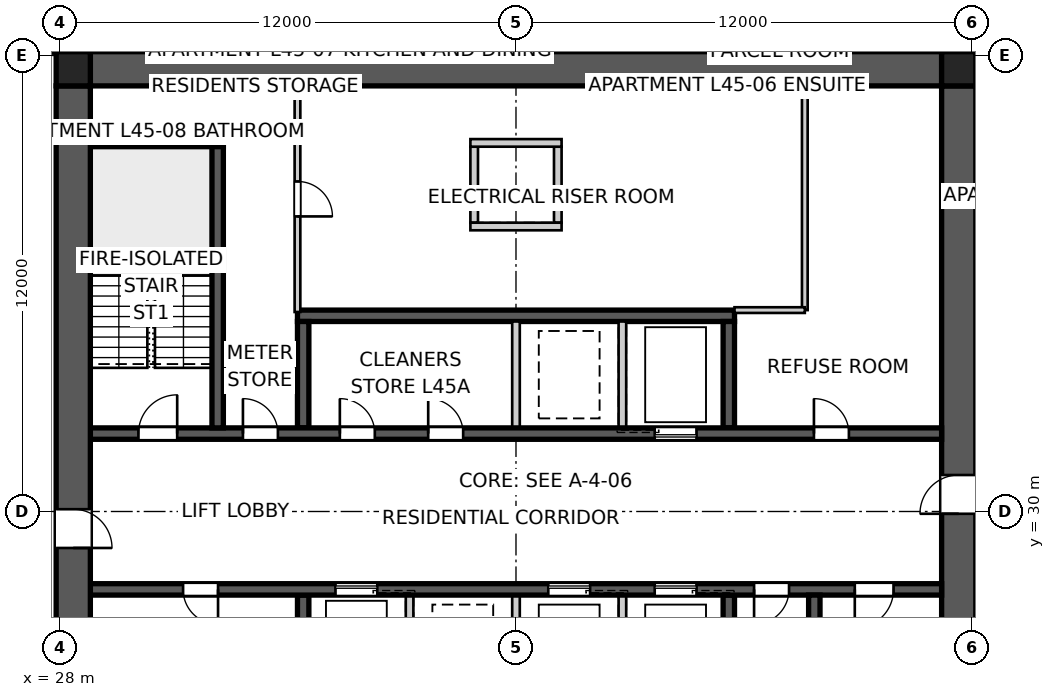
"""IFC4 building model, lengths in metres.
Left out: names, types, materials, properties, quantities, classifications, styles, units other than length and angle.
Written with IfcOpenShell. Run it as: python <this file> out.ifc"""

import sys

from ifc_helpers import new_model, si_unit, direction, frame, frame_2d, origin, origin_2d, place, context, subcontext, project, spatial, polyline, rectangle, outline, extrude, element, fill, save


model = new_model("IFC4")
c1 = context("Model", 3, precision=1e-05, world=origin(), true_north=direction((0.0, 1.0)))
c2 = subcontext(c1, "Body", "Model", "MODEL_VIEW")
j1 = project(units=[si_unit("LENGTHUNIT", "METRE"), si_unit("PLANEANGLEUNIT", "RADIAN")], contexts=[c1])
p1 = place(None, origin())
s1 = spatial("IfcSite", under=j1, at=p1, CompositionType="ELEMENT")
p2 = place(p1, origin())
s2 = spatial("IfcBuilding", under=s1, at=p2, CompositionType="ELEMENT")
p3 = place(p2, frame((0.0, 0.0, 164.2)))
s3 = spatial("IfcBuildingStorey", under=s2, at=p3, CompositionType="ELEMENT", Elevation=164.2)
p4 = place(p3, frame((28.8, 41.65, 0.0), z_axis=(0.0, 0.0, 1.0), x_axis=(1.0, 0.0, 0.0)))
e1 = element("IfcWall", 1, at=p4, inside=s3, PredefinedType="SHEAR", context=c2, shape_type="SweptSolid", body=[
    extrude(outline(polyline([(0.0, -0.45), (22.4, -0.45), (22.4, -0.025), (22.85, -0.025), (22.85, 0.025), (22.4, 0.025), (22.4, 0.45), (0.0, 0.45), (0.0, 0.025), (-0.45, 0.025), (-0.45, -0.025), (0.0, -0.025), (0.0, -0.45)])), origin(), (0.0, 0.0, 1.0), 3.4),
])
p5 = place(p3, frame((51.65, 18.8, 0.0), z_axis=(0.0, 0.0, 1.0), x_axis=(0.0, 1.0, 0.0)))
e2 = element("IfcWall", 2, at=p5, inside=s3, PredefinedType="SHEAR", context=c2, shape_type="SweptSolid", body=[
    extrude(outline(polyline([(0.0, -0.45), (22.4, -0.45), (22.4, -0.025), (22.85, -0.025), (22.85, 0.025), (22.4, 0.025), (22.4, 0.45), (0.0, 0.45), (0.0, 0.025), (-0.45, 0.025), (-0.45, -0.025), (0.0, -0.025), (0.0, -0.45)])), origin(), (0.0, 0.0, 1.0), 3.4),
])
p6 = place(p5, frame((11.14, 0.0, 0.0)))
e3 = element("IfcOpeningElement", 3, at=p6, cuts=e2, PredefinedType="OPENING", context=c2, shape_type="SweptSolid", body=[
    extrude(rectangle(XDim=1.02, YDim=2.4, at=frame_2d((0.51, 1.2))), frame((0.0, 0.46, 0.0), z_axis=(0.0, -1.0, 0.0), x_axis=(1.0, 0.0, 0.0)), (0.0, 0.0, 1.0), 0.92),
])
p7 = place(p3, frame((28.35, 41.2, 0.0), z_axis=(0.0, 0.0, 1.0), x_axis=(0.0, -1.0, 0.0)))
e4 = element("IfcWall", 4, at=p7, inside=s3, PredefinedType="SHEAR", context=c2, shape_type="SweptSolid", body=[
    extrude(outline(polyline([(0.0, -0.45), (22.4, -0.45), (22.4, -0.025), (22.85, -0.025), (22.85, 0.025), (22.4, 0.025), (22.4, 0.45), (0.0, 0.45), (0.0, 0.025), (-0.45, 0.025), (-0.45, -0.025), (0.0, -0.025), (0.0, -0.45)])), origin(), (0.0, 0.0, 1.0), 3.4),
])
p8 = place(p7, frame((11.14, 0.0, 0.0)))
e5 = element("IfcOpeningElement", 5, at=p8, cuts=e4, PredefinedType="OPENING", context=c2, shape_type="SweptSolid", body=[
    extrude(rectangle(XDim=1.02, YDim=2.4, at=frame_2d((0.51, 1.2))), frame((0.0, 0.46, 0.0), z_axis=(0.0, -1.0, 0.0), x_axis=(1.0, 0.0, 0.0)), (0.0, 0.0, 1.0), 0.92),
])
p9 = place(p3, frame((28.8, 32.05, 0.0), z_axis=(0.0, 0.0, 1.0), x_axis=(1.0, 0.0, 0.0)))
e6 = element("IfcWall", 6, at=p9, inside=s3, PredefinedType="SHEAR", context=c2, shape_type="SweptSolid", body=[
    extrude(rectangle(XDim=22.4, YDim=0.3, at=frame_2d((11.2, 0.0))), origin(), (0.0, 0.0, 1.0), 3.4),
])
p10 = place(p9, frame((19.04, 0.0, 0.0)))
e7 = element("IfcOpeningElement", 7, at=p10, cuts=e6, PredefinedType="OPENING", context=c2, shape_type="SweptSolid", body=[
    extrude(rectangle(XDim=0.92, YDim=2.1, at=frame_2d((0.46, 1.05))), frame((0.0, 0.16, 0.0), z_axis=(0.0, -1.0, 0.0), x_axis=(1.0, 0.0, 0.0)), (0.0, 0.0, 1.0), 0.32),
])
p11 = place(p9, frame((1.265, 0.0, 0.0)))
e8 = element("IfcOpeningElement", 8, at=p11, cuts=e6, PredefinedType="OPENING", context=c2, shape_type="SweptSolid", body=[
    extrude(rectangle(XDim=1.02, YDim=2.1, at=frame_2d((0.51, 1.05))), frame((0.0, 0.16, 0.0), z_axis=(0.0, -1.0, 0.0), x_axis=(1.0, 0.0, 0.0)), (0.0, 0.0, 1.0), 0.32),
])
p12 = place(p9, frame((4.015, 0.0, 0.0)))
e9 = element("IfcOpeningElement", 9, at=p12, cuts=e6, PredefinedType="OPENING", context=c2, shape_type="SweptSolid", body=[
    extrude(rectangle(XDim=0.92, YDim=2.1, at=frame_2d((0.46, 1.05))), frame((0.0, 0.16, 0.0), z_axis=(0.0, -1.0, 0.0), x_axis=(1.0, 0.0, 0.0)), (0.0, 0.0, 1.0), 0.32),
])
p13 = place(p9, frame((6.565, 0.0, 0.0)))
e10 = element("IfcOpeningElement", 10, at=p13, cuts=e6, PredefinedType="OPENING", context=c2, shape_type="SweptSolid", body=[
    extrude(rectangle(XDim=0.92, YDim=2.1, at=frame_2d((0.46, 1.05))), frame((0.0, 0.16, 0.0), z_axis=(0.0, -1.0, 0.0), x_axis=(1.0, 0.0, 0.0)), (0.0, 0.0, 1.0), 0.32),
])
p14 = place(p9, frame((8.89, 0.0, 0.0)))
e11 = element("IfcOpeningElement", 11, at=p14, cuts=e6, PredefinedType="OPENING", context=c2, shape_type="SweptSolid", body=[
    extrude(rectangle(XDim=0.92, YDim=2.1, at=frame_2d((0.46, 1.05))), frame((0.0, 0.16, 0.0), z_axis=(0.0, -1.0, 0.0), x_axis=(1.0, 0.0, 0.0)), (0.0, 0.0, 1.0), 0.32),
])
p15 = place(p9, frame((14.85, 0.0, 0.0)))
e12 = element("IfcOpeningElement", 12, at=p15, cuts=e6, PredefinedType="OPENING", context=c2, shape_type="SweptSolid", body=[
    extrude(rectangle(XDim=1.1, YDim=2.1, at=frame_2d((0.55, 1.05))), frame((0.0, 0.16, 0.0), z_axis=(0.0, -1.0, 0.0), x_axis=(1.0, 0.0, 0.0)), (0.0, 0.0, 1.0), 0.32),
])
p16 = place(p3, frame((51.2, 27.95, 0.0), z_axis=(0.0, 0.0, 1.0), x_axis=(-1.0, 0.0, 0.0)))
e13 = element("IfcWall", 13, at=p16, inside=s3, PredefinedType="SHEAR", context=c2, shape_type="SweptSolid", body=[
    extrude(rectangle(XDim=22.4, YDim=0.3, at=frame_2d((11.2, 0.0))), origin(), (0.0, 0.0, 1.0), 3.4),
])
p17 = place(p16, frame((19.04, 0.0, 0.0)))
e14 = element("IfcOpeningElement", 14, at=p17, cuts=e13, PredefinedType="OPENING", context=c2, shape_type="SweptSolid", body=[
    extrude(rectangle(XDim=0.92, YDim=2.1, at=frame_2d((0.46, 1.05))), frame((0.0, 0.16, 0.0), z_axis=(0.0, -1.0, 0.0), x_axis=(1.0, 0.0, 0.0)), (0.0, 0.0, 1.0), 0.32),
])
p18 = place(p16, frame((1.265, 0.0, 0.0)))
e15 = element("IfcOpeningElement", 15, at=p18, cuts=e13, PredefinedType="OPENING", context=c2, shape_type="SweptSolid", body=[
    extrude(rectangle(XDim=1.02, YDim=2.1, at=frame_2d((0.51, 1.05))), frame((0.0, 0.16, 0.0), z_axis=(0.0, -1.0, 0.0), x_axis=(1.0, 0.0, 0.0)), (0.0, 0.0, 1.0), 0.32),
])
p19 = place(p16, frame((4.015, 0.0, 0.0)))
e16 = element("IfcOpeningElement", 16, at=p19, cuts=e13, PredefinedType="OPENING", context=c2, shape_type="SweptSolid", body=[
    extrude(rectangle(XDim=0.92, YDim=2.1, at=frame_2d((0.46, 1.05))), frame((0.0, 0.16, 0.0), z_axis=(0.0, -1.0, 0.0), x_axis=(1.0, 0.0, 0.0)), (0.0, 0.0, 1.0), 0.32),
])
p20 = place(p16, frame((6.45, 0.0, 0.0)))
e17 = element("IfcOpeningElement", 17, at=p20, cuts=e13, PredefinedType="OPENING", context=c2, shape_type="SweptSolid", body=[
    extrude(rectangle(XDim=1.1, YDim=2.1, at=frame_2d((0.55, 1.05))), frame((0.0, 0.16, 0.0), z_axis=(0.0, -1.0, 0.0), x_axis=(1.0, 0.0, 0.0)), (0.0, 0.0, 1.0), 0.32),
])
p21 = place(p16, frame((9.25, 0.0, 0.0)))
e18 = element("IfcOpeningElement", 18, at=p21, cuts=e13, PredefinedType="OPENING", context=c2, shape_type="SweptSolid", body=[
    extrude(rectangle(XDim=1.1, YDim=2.1, at=frame_2d((0.55, 1.05))), frame((0.0, 0.16, 0.0), z_axis=(0.0, -1.0, 0.0), x_axis=(1.0, 0.0, 0.0)), (0.0, 0.0, 1.0), 0.32),
])
p22 = place(p16, frame((14.85, 0.0, 0.0)))
e19 = element("IfcOpeningElement", 19, at=p22, cuts=e13, PredefinedType="OPENING", context=c2, shape_type="SweptSolid", body=[
    extrude(rectangle(XDim=1.1, YDim=2.1, at=frame_2d((0.55, 1.05))), frame((0.0, 0.16, 0.0), z_axis=(0.0, -1.0, 0.0), x_axis=(1.0, 0.0, 0.0)), (0.0, 0.0, 1.0), 0.32),
])
p23 = place(p3, frame((34.25, 35.15, 0.0), z_axis=(0.0, 0.0, 1.0), x_axis=(1.0, 0.0, 0.0)))
e20 = element("IfcWall", 20, at=p23, inside=s3, PredefinedType="SHEAR", context=c2, shape_type="SweptSolid", body=[
    extrude(rectangle(XDim=11.5, YDim=0.3, at=frame_2d((5.75, 0.0))), origin(), (0.0, 0.0, 1.0), 3.4),
])
for number, where, z_axis, x_axis in (
    (21, (34.4, 32.2, 0.0), (0.0, 0.0, 1.0), (0.0, 1.0, 0.0)),
    (22, (45.6, 27.8, 0.0), (0.0, 0.0, 1.0), (0.0, -1.0, 0.0)),
):
    element("IfcWall", number, at=place(p3, frame(where, z_axis=z_axis, x_axis=x_axis)), inside=s3, PredefinedType="SHEAR", context=c2, shape_type="SweptSolid", body=[
        extrude(rectangle(XDim=2.8, YDim=0.3, at=frame_2d((1.4, 0.0))), origin(), (0.0, 0.0, 1.0), 3.4),
    ])
for number, where, z_axis, x_axis in (
    (23, (42.8, 27.8, 0.0), (0.0, 0.0, 1.0), (0.0, -1.0, 0.0)),
    (24, (40.0, 32.2, 0.0), (0.0, 0.0, 1.0), (0.0, 1.0, 0.0)),
    (25, (40.0, 27.8, 0.0), (0.0, 0.0, 1.0), (0.0, -1.0, 0.0)),
    (26, (42.8, 32.2, 0.0), (0.0, 0.0, 1.0), (0.0, 1.0, 0.0)),
    (27, (37.2, 27.8, 0.0), (0.0, 0.0, 1.0), (0.0, -1.0, 0.0)),
):
    element("IfcWall", number, at=place(p3, frame(where, z_axis=z_axis, x_axis=x_axis)), inside=s3, PredefinedType="SOLIDWALL", context=c2, shape_type="SweptSolid", body=[
        extrude(rectangle(XDim=2.8, YDim=0.2, at=frame_2d((1.4, 0.0))), origin(), (0.0, 0.0, 1.0), 3.4),
    ])
for number, where, z_axis, x_axis in (
    (28, (45.6, 32.2, 0.0), (0.0, 0.0, 1.0), (0.0, 1.0, 0.0)),
    (29, (34.4, 27.8, 0.0), (0.0, 0.0, 1.0), (0.0, -1.0, 0.0)),
):
    element("IfcWall", number, at=place(p3, frame(where, z_axis=z_axis, x_axis=x_axis)), inside=s3, PredefinedType="SHEAR", context=c2, shape_type="SweptSolid", body=[
        extrude(rectangle(XDim=2.8, YDim=0.3, at=frame_2d((1.4, 0.0))), origin(), (0.0, 0.0, 1.0), 3.4),
    ])
p24 = place(p3, frame((32.15, 32.2, 0.0), z_axis=(0.0, 0.0, 1.0), x_axis=(0.0, 1.0, 0.0)))
e30 = element("IfcWall", 30, at=p24, inside=s3, PredefinedType="SHEAR", context=c2, shape_type="SweptSolid", body=[
    extrude(rectangle(XDim=7.7, YDim=0.3, at=frame_2d((3.85, 0.0))), origin(), (0.0, 0.0, 1.0), 3.4),
])
p25 = place(p3, frame((28.8, 39.75, 0.0), z_axis=(0.0, 0.0, 1.0), x_axis=(1.0, 0.0, 0.0)))
e31 = element("IfcWall", 31, at=p25, inside=s3, PredefinedType="SHEAR", context=c2, shape_type="SweptSolid", body=[
    extrude(rectangle(XDim=3.5, YDim=0.3, at=frame_2d((1.75, 0.0))), origin(), (0.0, 0.0, 1.0), 3.4),
])
p26 = place(p3, frame((47.85, 27.8, 0.0), z_axis=(0.0, 0.0, 1.0), x_axis=(0.0, -1.0, 0.0)))
e32 = element("IfcWall", 32, at=p26, inside=s3, PredefinedType="SHEAR", context=c2, shape_type="SweptSolid", body=[
    extrude(rectangle(XDim=7.7, YDim=0.3, at=frame_2d((3.85, 0.0))), origin(), (0.0, 0.0, 1.0), 3.4),
])
for number, where, z_axis, x_axis in (
    (33, (38.9, 37.6, 0.0), (0.0, 0.0, 1.0), (0.0, 1.0, 0.0)),
    (34, (41.1, 37.6, 0.0), (0.0, 0.0, 1.0), (0.0, 1.0, 0.0)),
):
    element("IfcWall", number, at=place(p3, frame(where, z_axis=z_axis, x_axis=x_axis)), inside=s3, PredefinedType="SOLIDWALL", context=c2, shape_type="SweptSolid", body=[
        extrude(rectangle(XDim=2.0, YDim=0.2, at=frame_2d((1.0, 0.0))), origin(), (0.0, 0.0, 1.0), 3.4),
    ])
for number, where, z_axis, x_axis in (
    (35, (38.8, 37.5, 0.0), (0.0, 0.0, 1.0), (1.0, 0.0, 0.0)),
    (36, (38.8, 39.7, 0.0), (0.0, 0.0, 1.0), (1.0, 0.0, 0.0)),
):
    element("IfcWall", number, at=place(p3, frame(where, z_axis=z_axis, x_axis=x_axis)), inside=s3, PredefinedType="SOLIDWALL", context=c2, shape_type="SweptSolid", body=[
        extrude(rectangle(XDim=2.4, YDim=0.2, at=frame_2d((1.2, 0.0))), origin(), (0.0, 0.0, 1.0), 3.4),
    ])
for number, where, z_axis, x_axis in (
    (37, (51.65, 41.65, 0.0), (0.0, 0.0, 1.0), (1.0, 0.0, 0.0)),
    (38, (28.35, 41.65, 0.0), (0.0, 0.0, 1.0), (1.0, 0.0, 0.0)),
):
    element("IfcColumn", number, at=place(p3, frame(where, z_axis=z_axis, x_axis=x_axis)), inside=s3, PredefinedType="COLUMN", context=c2, shape_type="SweptSolid", body=[
        extrude(rectangle(XDim=0.9, YDim=0.9, at=origin_2d()), origin(), (0.0, 0.0, 1.0), 3.4),
    ])
p27 = place(p3, frame((34.25, 41.2, 0.0), z_axis=(0.0, 0.0, 1.0), x_axis=(0.0, -1.0, 0.0)))
e39 = element("IfcWall", 39, at=p27, inside=s3, PredefinedType="SOLIDWALL", context=c2, shape_type="SweptSolid", body=[
    extrude(rectangle(XDim=5.95, YDim=0.15, at=frame_2d((2.975, 0.0))), origin(), (0.0, 0.0, 1.0), 3.25),
])
p28 = place(p27, frame((2.515, 0.0, 0.0)))
e40 = element("IfcOpeningElement", 40, at=p28, cuts=e39, PredefinedType="OPENING", context=c2, shape_type="SweptSolid", body=[
    extrude(rectangle(XDim=0.92, YDim=2.1, at=frame_2d((0.46, 1.05))), frame((0.0, 0.085, 0.0), z_axis=(0.0, -1.0, 0.0), x_axis=(1.0, 0.0, 0.0)), (0.0, 0.0, 1.0), 0.17),
])
p29 = place(p3, frame((47.6, 41.2, 0.0), z_axis=(0.0, 0.0, 1.0), x_axis=(0.0, -1.0, 0.0)))
e41 = element("IfcWall", 41, at=p29, inside=s3, PredefinedType="SOLIDWALL", context=c2, shape_type="SweptSolid", body=[
    extrude(rectangle(XDim=5.9, YDim=0.15, at=frame_2d((2.95, 0.0))), origin(), (0.0, 0.0, 1.0), 3.25),
])
p30 = place(p3, frame((47.6, 35.3, 0.0), z_axis=(0.0, 0.0, 1.0), x_axis=(-1.0, 0.0, 0.0)))
e42 = element("IfcWall", 42, at=p30, inside=s3, PredefinedType="SOLIDWALL", context=c2, shape_type="SweptSolid", body=[
    extrude(rectangle(XDim=1.85, YDim=0.15, at=frame_2d((0.925, 0.0))), origin(), (0.0, 0.0, 1.0), 3.25),
])
p31 = place(p3, frame((27.9, 44.35, 0.0), z_axis=(0.0, 0.0, 1.0), x_axis=(0.0, -1.0, 0.0)))
e43 = element("IfcWall", 43, at=p31, inside=s3, PredefinedType="PARTITIONING", context=c2, shape_type="SweptSolid", body=[
    extrude(rectangle(XDim=2.3, YDim=0.2, at=frame_2d((1.15, 0.0))), origin(), (0.0, 0.0, 1.0), 3.25),
])
p32 = place(p3, frame((52.1, 41.18, 0.0), z_axis=(0.0, 0.0, 1.0), x_axis=(0.0, 1.0, 0.0)))
e44 = element("IfcWall", 44, at=p32, inside=s3, PredefinedType="PARTITIONING", context=c2, shape_type="SweptSolid", body=[
    extrude(rectangle(XDim=3.17, YDim=0.2, at=frame_2d((1.585, 0.0))), origin(), (0.0, 0.0, 1.0), 3.25),
])
p33 = place(p10, origin())
e45 = element("IfcDoor", 45, at=p33, inside=s3, OperationType="SINGLE_SWING_LEFT", PredefinedType="DOOR", context=c2, shape_type="SweptSolid", body=[
    extrude(rectangle(XDim=0.92, YDim=2.1, at=frame_2d((0.46, 1.05))), frame((0.0, 0.025, 0.0), z_axis=(0.0, -1.0, 0.0), x_axis=(1.0, 0.0, 0.0)), (0.0, 0.0, 1.0), 0.05),
])
fill(e7, e45)
p34 = place(p17, origin())
e46 = element("IfcDoor", 46, at=p34, inside=s3, OperationType="SINGLE_SWING_LEFT", PredefinedType="DOOR", context=c2, shape_type="SweptSolid", body=[
    extrude(rectangle(XDim=0.92, YDim=2.1, at=frame_2d((0.46, 1.05))), frame((0.0, 0.025, 0.0), z_axis=(0.0, -1.0, 0.0), x_axis=(1.0, 0.0, 0.0)), (0.0, 0.0, 1.0), 0.05),
])
fill(e14, e46)
p35 = place(p18, origin())
e47 = element("IfcDoor", 47, at=p35, inside=s3, OperationType="SINGLE_SWING_RIGHT", PredefinedType="DOOR", context=c2, shape_type="SweptSolid", body=[
    extrude(rectangle(XDim=1.02, YDim=2.1, at=frame_2d((0.51, 1.05))), frame((0.0, 0.025, 0.0), z_axis=(0.0, -1.0, 0.0), x_axis=(1.0, 0.0, 0.0)), (0.0, 0.0, 1.0), 0.05),
])
fill(e15, e47)
p36 = place(p11, origin())
e48 = element("IfcDoor", 48, at=p36, inside=s3, OperationType="SINGLE_SWING_RIGHT", PredefinedType="DOOR", context=c2, shape_type="SweptSolid", body=[
    extrude(rectangle(XDim=1.02, YDim=2.1, at=frame_2d((0.51, 1.05))), frame((0.0, 0.025, 0.0), z_axis=(0.0, -1.0, 0.0), x_axis=(1.0, 0.0, 0.0)), (0.0, 0.0, 1.0), 0.05),
])
fill(e8, e48)
p37 = place(p12, origin())
e49 = element("IfcDoor", 49, at=p37, inside=s3, OperationType="SINGLE_SWING_LEFT", PredefinedType="DOOR", context=c2, shape_type="SweptSolid", body=[
    extrude(rectangle(XDim=0.92, YDim=2.1, at=frame_2d((0.46, 1.05))), frame((0.0, 0.025, 0.0), z_axis=(0.0, -1.0, 0.0), x_axis=(1.0, 0.0, 0.0)), (0.0, 0.0, 1.0), 0.05),
])
fill(e9, e49)
p38 = place(p19, origin())
e50 = element("IfcDoor", 50, at=p38, inside=s3, OperationType="SINGLE_SWING_RIGHT", PredefinedType="DOOR", context=c2, shape_type="SweptSolid", body=[
    extrude(rectangle(XDim=0.92, YDim=2.1, at=frame_2d((0.46, 1.05))), frame((0.0, 0.025, 0.0), z_axis=(0.0, -1.0, 0.0), x_axis=(1.0, 0.0, 0.0)), (0.0, 0.0, 1.0), 0.05),
])
fill(e16, e50)
p39 = place(p28, origin())
e51 = element("IfcDoor", 51, at=p39, inside=s3, OperationType="SINGLE_SWING_RIGHT", PredefinedType="DOOR", context=c2, shape_type="SweptSolid", body=[
    extrude(rectangle(XDim=0.92, YDim=2.1, at=frame_2d((0.46, 1.05))), frame((0.0, 0.025, 0.0), z_axis=(0.0, -1.0, 0.0), x_axis=(1.0, 0.0, 0.0)), (0.0, 0.0, 1.0), 0.05),
])
fill(e40, e51)
p40 = place(p13, origin())
e52 = element("IfcDoor", 52, at=p40, inside=s3, OperationType="SINGLE_SWING_LEFT", PredefinedType="DOOR", context=c2, shape_type="SweptSolid", body=[
    extrude(rectangle(XDim=0.92, YDim=2.1, at=frame_2d((0.46, 1.05))), frame((0.0, 0.025, 0.0), z_axis=(0.0, -1.0, 0.0), x_axis=(1.0, 0.0, 0.0)), (0.0, 0.0, 1.0), 0.05),
])
fill(e10, e52)
p41 = place(p14, origin())
e53 = element("IfcDoor", 53, at=p41, inside=s3, OperationType="SINGLE_SWING_LEFT", PredefinedType="DOOR", context=c2, shape_type="SweptSolid", body=[
    extrude(rectangle(XDim=0.92, YDim=2.1, at=frame_2d((0.46, 1.05))), frame((0.0, 0.025, 0.0), z_axis=(0.0, -1.0, 0.0), x_axis=(1.0, 0.0, 0.0)), (0.0, 0.0, 1.0), 0.05),
])
fill(e11, e53)
p42 = place(p6, origin())
e54 = element("IfcDoor", 54, at=p42, inside=s3, OperationType="SINGLE_SWING_LEFT", PredefinedType="DOOR", context=c2, shape_type="SweptSolid", body=[
    extrude(rectangle(XDim=1.02, YDim=2.4, at=frame_2d((0.51, 1.2))), frame((0.0, 0.025, 0.0), z_axis=(0.0, -1.0, 0.0), x_axis=(1.0, 0.0, 0.0)), (0.0, 0.0, 1.0), 0.05),
])
fill(e3, e54)
p43 = place(p8, origin())
e55 = element("IfcDoor", 55, at=p43, inside=s3, OperationType="SINGLE_SWING_RIGHT", PredefinedType="DOOR", context=c2, shape_type="SweptSolid", body=[
    extrude(rectangle(XDim=1.02, YDim=2.4, at=frame_2d((0.51, 1.2))), frame((0.0, 0.025, 0.0), z_axis=(0.0, -1.0, 0.0), x_axis=(1.0, 0.0, 0.0)), (0.0, 0.0, 1.0), 0.05),
])
fill(e5, e55)
p44 = place(p20, origin())
e56 = element("IfcDoor", 56, at=p44, inside=s3, OperationType="SLIDING_TO_LEFT", PredefinedType="DOOR", context=c2, shape_type="SweptSolid", body=[
    extrude(rectangle(XDim=1.1, YDim=2.1, at=frame_2d((0.55, 1.05))), frame((0.0, 0.025, 0.0), z_axis=(0.0, -1.0, 0.0), x_axis=(1.0, 0.0, 0.0)), (0.0, 0.0, 1.0), 0.05),
])
fill(e17, e56)
p45 = place(p21, origin())
e57 = element("IfcDoor", 57, at=p45, inside=s3, OperationType="SLIDING_TO_LEFT", PredefinedType="DOOR", context=c2, shape_type="SweptSolid", body=[
    extrude(rectangle(XDim=1.1, YDim=2.1, at=frame_2d((0.55, 1.05))), frame((0.0, 0.025, 0.0), z_axis=(0.0, -1.0, 0.0), x_axis=(1.0, 0.0, 0.0)), (0.0, 0.0, 1.0), 0.05),
])
fill(e18, e57)
p46 = place(p15, origin())
e58 = element("IfcDoor", 58, at=p46, inside=s3, OperationType="SLIDING_TO_LEFT", PredefinedType="DOOR", context=c2, shape_type="SweptSolid", body=[
    extrude(rectangle(XDim=1.1, YDim=2.1, at=frame_2d((0.55, 1.05))), frame((0.0, 0.025, 0.0), z_axis=(0.0, -1.0, 0.0), x_axis=(1.0, 0.0, 0.0)), (0.0, 0.0, 1.0), 0.05),
])
fill(e12, e58)
p47 = place(p22, origin())
e59 = element("IfcDoor", 59, at=p47, inside=s3, OperationType="SLIDING_TO_LEFT", PredefinedType="DOOR", context=c2, shape_type="SweptSolid", body=[
    extrude(rectangle(XDim=1.1, YDim=2.1, at=frame_2d((0.55, 1.05))), frame((0.0, 0.025, 0.0), z_axis=(0.0, -1.0, 0.0), x_axis=(1.0, 0.0, 0.0)), (0.0, 0.0, 1.0), 0.05),
])
fill(e19, e59)
save(model, sys.argv[1])
